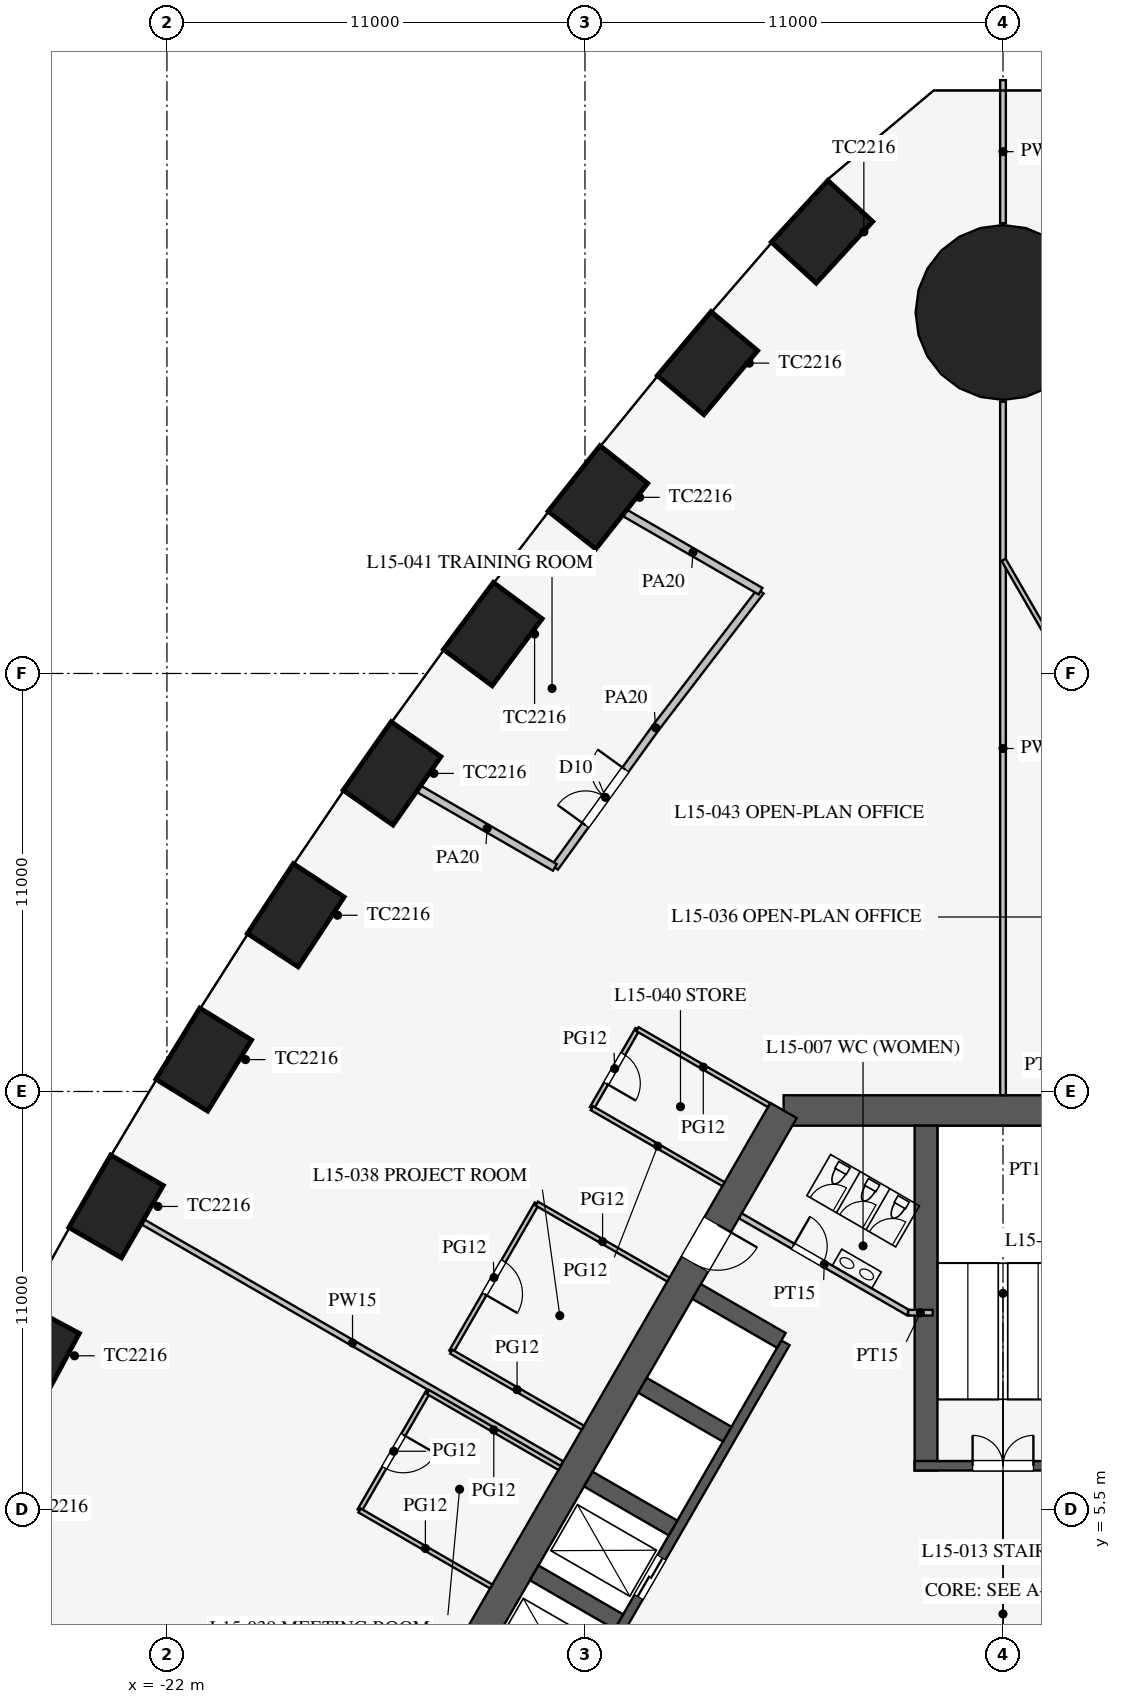
"""IFC4 building model, lengths in metres.
Left out: names, types, materials, properties, quantities, classifications, styles, units other than length and angle.
Written with IfcOpenShell. Run it as: python <this file> out.ifc"""

import sys

from ifc_helpers import new_model, si_unit, direction, frame, frame_2d, origin, origin_2d, place, context, subcontext, project, spatial, rectangle, circle, extrude, element, fill, save


model = new_model("IFC4")
c1 = context("Model", 3, precision=1e-05, world=origin(), true_north=direction((0.0, 1.0)))
c2 = subcontext(c1, "Body", "Model", "MODEL_VIEW")
j1 = project(units=[si_unit("LENGTHUNIT", "METRE"), si_unit("PLANEANGLEUNIT", "RADIAN")], contexts=[c1])
p1 = place(None, origin())
s1 = spatial("IfcSite", under=j1, at=p1, CompositionType="ELEMENT")
p2 = place(p1, origin())
s2 = spatial("IfcBuilding", under=s1, at=p2, CompositionType="ELEMENT")
p3 = place(p2, frame((0.0, 0.0, 66.9)))
s3 = spatial("IfcBuildingStorey", under=s2, at=p3, CompositionType="ELEMENT", Elevation=66.9)
for number, where, z_axis, x_axis in (
    (1, (-4.762, 39.122, 0.0), (0.0, 0.0, 1.0), (-0.676, -0.737, 0.0)),
    (2, (-7.776, 35.667, 0.0), (0.0, 0.0, 1.0), (-0.643, -0.766, 0.0)),
    (3, (-10.66, 32.135, 0.0), (0.0, 0.0, 1.0), (-0.62, -0.784, 0.0)),
    (4, (-13.426, 28.536, 0.0), (0.0, 0.0, 1.0), (-0.597, -0.802, 0.0)),
    (5, (-16.076, 24.87, 0.0), (0.0, 0.0, 1.0), (-0.574, -0.819, 0.0)),
    (6, (-18.611, 21.137, 0.0), (0.0, 0.0, 1.0), (-0.549, -0.836, 0.0)),
    (7, (-21.031, 17.339, 0.0), (0.0, 0.0, 1.0), (-0.525, -0.851, 0.0)),
    (8, (-23.338, 13.474, 0.0), (0.0, 0.0, 1.0), (-0.5, -0.866, 0.0)),
    (9, (-25.531, 9.544, 0.0), (0.0, 0.0, 1.0), (-0.475, -0.88, 0.0)),
):
    element("IfcColumn", number, at=place(p3, frame(where, z_axis=z_axis, x_axis=x_axis)), inside=s3, PredefinedType="COLUMN", context=c2, shape_type="SweptSolid", body=[
        extrude(rectangle(XDim=2.2, YDim=1.6, at=origin_2d()), origin(), (0.0, 0.0, 1.0), 4.2),
    ])
p4 = place(p3, frame((0.0, 37.0, 0.0), z_axis=(0.0, 0.0, 1.0), x_axis=(1.0, 0.0, 0.0)))
e10 = element("IfcColumn", 10, at=p4, inside=s3, PredefinedType="COLUMN", context=c2, shape_type="SweptSolid", body=[
    extrude(circle(Radius=2.3, at=origin_2d()), origin(), (0.0, 0.0, 1.0), 4.2),
])
p5 = place(p3, frame((5.773, 16.0, 0.0), z_axis=(0.0, 0.0, 1.0), x_axis=(-1.0, 0.0, 0.0)))
e11 = element("IfcWall", 11, at=p5, inside=s3, PredefinedType="SHEAR", context=c2, shape_type="SweptSolid", body=[
    extrude(rectangle(XDim=11.547, YDim=0.8, at=frame_2d((5.773, 0.0))), origin(), (0.0, 0.0, 1.0), 4.2),
])
p6 = place(p3, frame((-5.773, 16.0, 0.0), z_axis=(0.0, 0.0, 1.0), x_axis=(-0.500002442456, -0.866023993627, 0.0)))
e12 = element("IfcWall", 12, at=p6, inside=s3, PredefinedType="SHEAR", context=c2, shape_type="SweptSolid", body=[
    extrude(rectangle(XDim=21.939, YDim=0.8, at=frame_2d((10.97, 0.0))), origin(), (0.0, 0.0, 1.0), 4.2),
])
p7 = place(p6, frame((17.27, 0.0, 0.0)))
e13 = element("IfcOpeningElement", 13, at=p7, cuts=e12, PredefinedType="OPENING", context=c2, shape_type="SweptSolid", body=[
    extrude(rectangle(XDim=1.2, YDim=2.1, at=frame_2d((0.6, 1.05))), frame((0.0, 0.41, 0.0), z_axis=(0.0, -1.0, 0.0), x_axis=(1.0, 0.0, 0.0)), (0.0, 0.0, 1.0), 0.82),
])
p8 = place(p6, frame((3.47, 0.0, 0.0)))
e14 = element("IfcOpeningElement", 14, at=p8, cuts=e12, PredefinedType="OPENING", context=c2, shape_type="SweptSolid", body=[
    extrude(rectangle(XDim=1.2, YDim=2.1, at=frame_2d((0.6, 1.05))), frame((0.0, 0.41, 0.0), z_axis=(0.0, -1.0, 0.0), x_axis=(1.0, 0.0, 0.0)), (0.0, 0.0, 1.0), 0.82),
])
p9 = place(p3, frame((-5.724, 9.886, 0.0), z_axis=(0.0, 0.0, 1.0), x_axis=(-0.500001763848, -0.866024385424, 0.0)))
e15 = element("IfcWall", 15, at=p9, inside=s3, PredefinedType="SHEAR", context=c2, shape_type="SweptSolid", body=[
    extrude(rectangle(XDim=11.4, YDim=0.25, at=frame_2d((5.7, 0.0))), origin(), (0.0, 0.0, 1.0), 4.2),
])
p10 = place(p9, frame((6.525, 0.0, 0.0)))
e16 = element("IfcOpeningElement", 16, at=p10, cuts=e15, PredefinedType="OPENING", context=c2, shape_type="SweptSolid", body=[
    extrude(rectangle(XDim=1.2, YDim=2.2, at=frame_2d((0.6, 1.1))), frame((0.0, 0.135, 0.0), z_axis=(0.0, -1.0, 0.0), x_axis=(1.0, 0.0, 0.0)), (0.0, 0.0, 1.0), 0.27),
])
p11 = place(p9, frame((9.375, 0.0, 0.0)))
e17 = element("IfcOpeningElement", 17, at=p11, cuts=e15, PredefinedType="OPENING", context=c2, shape_type="SweptSolid", body=[
    extrude(rectangle(XDim=1.2, YDim=2.2, at=frame_2d((0.6, 1.1))), frame((0.0, 0.135, 0.0), z_axis=(0.0, -1.0, 0.0), x_axis=(1.0, 0.0, 0.0)), (0.0, 0.0, 1.0), 0.27),
])
p12 = place(p3, frame((-5.832, 9.949, 0.0), z_axis=(0.0, 0.0, 1.0), x_axis=(-0.866029291668, 0.499993265928, 0.0)))
e18 = element("IfcWall", 18, at=p12, inside=s3, PredefinedType="SHEAR", context=c2, shape_type="SweptSolid", body=[
    extrude(rectangle(XDim=2.575, YDim=0.45, at=frame_2d((1.288, 0.0))), origin(), (0.0, 0.0, 1.0), 4.2),
])
for number, where, z_axis, x_axis in (
    (19, (-7.257, 7.481, 0.0), (0.0, 0.0, 1.0), (-0.866, 0.5, 0.0)),
    (20, (-8.682, 5.012, 0.0), (0.0, 0.0, 1.0), (-0.866, 0.5, 0.0)),
    (21, (-10.107, 2.544, 0.0), (0.0, 0.0, 1.0), (-0.866, 0.5, 0.0)),
):
    element("IfcWall", number, at=place(p3, frame(where, z_axis=z_axis, x_axis=x_axis)), inside=s3, PredefinedType="SHEAR", context=c2, shape_type="SweptSolid", body=[
        extrude(rectangle(XDim=2.575, YDim=0.45, at=frame_2d((1.288, 0.0))), origin(), (0.0, 0.0, 1.0), 4.2),
    ])
p13 = place(p3, frame((-2.025, 6.525, 0.0), z_axis=(0.0, 0.0, 1.0), x_axis=(0.0, 1.0, 0.0)))
e22 = element("IfcWall", 22, at=p13, inside=s3, PredefinedType="SHEAR", context=c2, shape_type="SweptSolid", body=[
    extrude(rectangle(XDim=9.075, YDim=0.6, at=frame_2d((4.538, 0.0))), origin(), (0.0, 0.0, 1.0), 4.2),
])
p14 = place(p3, frame((2.325, 6.65, 0.0), z_axis=(0.0, 0.0, 1.0), x_axis=(-1.0, 0.0, 0.0)))
e23 = element("IfcWall", 23, at=p14, inside=s3, PredefinedType="SHEAR", context=c2, shape_type="SweptSolid", body=[
    extrude(rectangle(XDim=4.65, YDim=0.25, at=frame_2d((2.325, 0.0))), origin(), (0.0, 0.0, 1.0), 4.2),
])
p15 = place(p14, frame((1.525, 0.0, 0.0)))
e24 = element("IfcOpeningElement", 24, at=p15, cuts=e23, PredefinedType="OPENING", context=c2, shape_type="SweptSolid", body=[
    extrude(rectangle(XDim=1.6, YDim=2.1, at=frame_2d((0.8, 1.05))), frame((0.0, 0.135, 0.0), z_axis=(0.0, -1.0, 0.0), x_axis=(1.0, 0.0, 0.0)), (0.0, 0.0, 1.0), 0.27),
])
p16 = place(p3, frame((-2.495, 10.678, 0.0), z_axis=(0.0, 0.0, 1.0), x_axis=(-0.86602216432, 0.500005610874, 0.0)))
e25 = element("IfcWall", 25, at=p16, inside=s3, PredefinedType="PARTITIONING", context=c2, shape_type="SweptSolid", body=[
    extrude(rectangle(XDim=5.1, YDim=0.15, at=frame_2d((2.55, 0.0))), origin(), (0.0, 0.0, 1.0), 4.0),
])
p17 = place(p16, frame((2.6, 0.0, 0.0)))
e26 = element("IfcOpeningElement", 26, at=p17, cuts=e25, PredefinedType="OPENING", context=c2, shape_type="SweptSolid", body=[
    extrude(rectangle(XDim=0.9, YDim=2.1, at=frame_2d((0.45, 1.05))), frame((0.0, 0.085, 0.0), z_axis=(0.0, -1.0, 0.0), x_axis=(1.0, 0.0, 0.0)), (0.0, 0.0, 1.0), 0.17),
])
p18 = place(p3, frame((-2.495, 10.678, 0.0), z_axis=(0.0, 0.0, 1.0), x_axis=(1.0, 0.0, 0.0)))
e27 = element("IfcWall", 27, at=p18, inside=s3, PredefinedType="PARTITIONING", context=c2, shape_type="SweptSolid", body=[
    extrude(rectangle(XDim=0.645, YDim=0.15, at=frame_2d((0.323, 0.0))), origin(), (0.0, 0.0, 1.0), 4.0),
])
p19 = place(p3, frame((0.0, 16.4, 0.0), z_axis=(0.0, 0.0, 1.0), x_axis=(0.0, 1.0, 0.0)))
e28 = element("IfcWall", 28, at=p19, inside=s3, PredefinedType="PARTITIONING", context=c2, shape_type="SweptSolid", body=[
    extrude(rectangle(XDim=18.25, YDim=0.15, at=frame_2d((9.125, 0.0))), origin(), (0.0, 0.0, 1.0), 2.3),
])
p20 = place(p3, frame((0.0, 39.35, 0.0), z_axis=(0.0, 0.0, 1.0), x_axis=(0.0, 1.0, 0.0)))
e29 = element("IfcWall", 29, at=p20, inside=s3, PredefinedType="PARTITIONING", context=c2, shape_type="SweptSolid", body=[
    extrude(rectangle(XDim=3.764, YDim=0.15, at=frame_2d((1.882, 0.0))), origin(), (0.0, 0.0, 1.0), 2.3),
])
p21 = place(p3, frame((26.415, -15.231, 0.0), z_axis=(0.0, 0.0, 1.0), x_axis=(-0.50000091641, 0.866024874695, 0.0)))
e30 = element("IfcWall", 30, at=p21, inside=s3, PredefinedType="PARTITIONING", context=c2, shape_type="SweptSolid", body=[
    extrude(rectangle(XDim=52.796, YDim=0.12, at=frame_2d((26.398, 0.0))), origin(), (0.0, 0.0, 1.0), 2.9),
])
p22 = place(p21, frame((10.2, 0.0, 0.15)))
e31 = element("IfcOpeningElement", 31, at=p22, cuts=e30, PredefinedType="OPENING", context=c2, shape_type="SweptSolid", body=[
    extrude(rectangle(XDim=1.8, YDim=2.1, at=frame_2d((0.9, 1.05))), frame((0.0, 0.07, 0.0), z_axis=(0.0, -1.0, 0.0), x_axis=(1.0, 0.0, 0.0)), (0.0, 0.0, 1.0), 0.14),
])
p23 = place(p21, frame((40.8, 0.0, 0.15)))
e32 = element("IfcOpeningElement", 32, at=p23, cuts=e30, PredefinedType="OPENING", context=c2, shape_type="SweptSolid", body=[
    extrude(rectangle(XDim=1.8, YDim=2.1, at=frame_2d((0.9, 1.05))), frame((0.0, 0.07, 0.0), z_axis=(0.0, -1.0, 0.0), x_axis=(1.0, 0.0, 0.0)), (0.0, 0.0, 1.0), 0.14),
])
p24 = place(p3, frame((-11.613, 6.705, 0.0), z_axis=(0.0, 0.0, 1.0), x_axis=(-0.866029791586, 0.499992400027, 0.0)))
e33 = element("IfcWall", 33, at=p24, inside=s3, PredefinedType="PARTITIONING", context=c2, shape_type="SweptSolid", body=[
    extrude(rectangle(XDim=12.709, YDim=0.15, at=frame_2d((6.354, 0.0))), origin(), (0.0, 0.0, 1.0), 2.8),
])
p25 = place(p3, frame((-15.131, 8.592, 0.0), z_axis=(0.0, 0.0, 1.0), x_axis=(-0.500012057535, -0.866018442252, 0.0)))
e34 = element("IfcWall", 34, at=p25, inside=s3, PredefinedType="PARTITIONING", context=c2, shape_type="SweptSolid", body=[
    extrude(rectangle(XDim=3.6, YDim=0.12, at=frame_2d((1.8, 0.0))), origin(), (0.0, 0.0, 1.0), 2.9),
])
p26 = place(p25, frame((1.3, 0.0, 0.15)))
e35 = element("IfcOpeningElement", 35, at=p26, cuts=e34, PredefinedType="OPENING", context=c2, shape_type="SweptSolid", body=[
    extrude(rectangle(XDim=1.0, YDim=2.1, at=frame_2d((0.5, 1.05))), frame((0.0, 0.07, 0.0), z_axis=(0.0, -1.0, 0.0), x_axis=(1.0, 0.0, 0.0)), (0.0, 0.0, 1.0), 0.14),
])
p27 = place(p3, frame((-9.619, 18.14, 0.0), z_axis=(0.0, 0.0, 1.0), x_axis=(-0.500001309137, -0.866024647952, 0.0)))
e36 = element("IfcWall", 36, at=p27, inside=s3, PredefinedType="PARTITIONING", context=c2, shape_type="SweptSolid", body=[
    extrude(rectangle(XDim=2.4, YDim=0.12, at=frame_2d((1.2, 0.0))), origin(), (0.0, 0.0, 1.0), 2.9),
])
p28 = place(p27, frame((0.75, 0.0, 0.15)))
e37 = element("IfcOpeningElement", 37, at=p28, cuts=e36, PredefinedType="OPENING", context=c2, shape_type="SweptSolid", body=[
    extrude(rectangle(XDim=0.9, YDim=2.1, at=frame_2d((0.45, 1.05))), frame((0.0, 0.07, 0.0), z_axis=(0.0, -1.0, 0.0), x_axis=(1.0, 0.0, 0.0)), (0.0, 0.0, 1.0), 0.14),
])
p29 = place(p3, frame((-12.269, 13.55, 0.0), z_axis=(0.0, 0.0, 1.0), x_axis=(-0.499990139034, -0.866031096941, 0.0)))
e38 = element("IfcWall", 38, at=p29, inside=s3, PredefinedType="PARTITIONING", context=c2, shape_type="SweptSolid", body=[
    extrude(rectangle(XDim=4.5, YDim=0.12, at=frame_2d((2.25, 0.0))), origin(), (0.0, 0.0, 1.0), 2.9),
])
p30 = place(p29, frame((1.75, 0.0, 0.15)))
e39 = element("IfcOpeningElement", 39, at=p30, cuts=e38, PredefinedType="OPENING", context=c2, shape_type="SweptSolid", body=[
    extrude(rectangle(XDim=1.0, YDim=2.1, at=frame_2d((0.5, 1.05))), frame((0.0, 0.07, 0.0), z_axis=(0.0, -1.0, 0.0), x_axis=(1.0, 0.0, 0.0)), (0.0, 0.0, 1.0), 0.14),
])
p31 = place(p3, frame((-11.667, 6.592, 0.0), z_axis=(0.0, 0.0, 1.0), x_axis=(-0.866026010844, 0.49999894854, 0.0)))
e40 = element("IfcWall", 40, at=p31, inside=s3, PredefinedType="PARTITIONING", context=c2, shape_type="SweptSolid", body=[
    extrude(rectangle(XDim=4.0, YDim=0.12, at=frame_2d((2.0, 0.0))), origin(), (0.0, 0.0, 1.0), 2.8),
])
for number, where, z_axis, x_axis in (
    (41, (-13.467, 3.474, 0.0), (0.0, 0.0, 1.0), (-0.866, 0.5, 0.0)),
    (42, (-11.055, 7.653, 0.0), (0.0, 0.0, 1.0), (-0.866, 0.5, 0.0)),
    (43, (-6.155, 16.14, 0.0), (0.0, 0.0, 1.0), (-0.866, 0.5, 0.0)),
    (44, (-8.805, 11.55, 0.0), (0.0, 0.0, 1.0), (-0.866, 0.5, 0.0)),
    (45, (-7.355, 14.061, 0.0), (0.0, 0.0, 1.0), (-0.866, 0.5, 0.0)),
):
    element("IfcWall", number, at=place(p3, frame(where, z_axis=z_axis, x_axis=x_axis)), inside=s3, PredefinedType="PARTITIONING", context=c2, shape_type="SweptSolid", body=[
        extrude(rectangle(XDim=4.0, YDim=0.12, at=frame_2d((2.0, 0.0))), origin(), (0.0, 0.0, 1.0), 2.9),
    ])
p32 = place(p3, frame((-9.144, 26.064, 0.0), z_axis=(0.0, 0.0, 1.0), x_axis=(-0.585376255171, -0.810761765183, 0.0)))
e46 = element("IfcWall", 46, at=p32, inside=s3, PredefinedType="PARTITIONING", context=c2, shape_type="SweptSolid", body=[
    extrude(rectangle(XDim=4.523, YDim=0.2, at=frame_2d((2.262, 0.0))), origin(), (0.0, 0.0, 1.0), 2.9),
])
p33 = place(p32, frame((1.35, 0.0, 0.15)))
e47 = element("IfcOpeningElement", 47, at=p33, cuts=e46, PredefinedType="OPENING", context=c2, shape_type="SweptSolid", body=[
    extrude(rectangle(XDim=1.8, YDim=2.1, at=frame_2d((0.9, 1.05))), frame((0.0, 0.11, 0.0), z_axis=(0.0, -1.0, 0.0), x_axis=(1.0, 0.0, 0.0)), (0.0, 0.0, 1.0), 0.22),
])
p34 = place(p3, frame((-6.38, 29.665, 0.0), z_axis=(0.0, 0.0, 1.0), x_axis=(-0.608818785139, -0.79330932609, 0.0)))
e48 = element("IfcWall", 48, at=p34, inside=s3, PredefinedType="PARTITIONING", context=c2, shape_type="SweptSolid", body=[
    extrude(rectangle(XDim=4.539, YDim=0.2, at=frame_2d((2.27, 0.0))), origin(), (0.0, 0.0, 1.0), 2.9),
])
p35 = place(p3, frame((-11.792, 22.396, 0.0), z_axis=(0.0, 0.0, 1.0), x_axis=(-0.865991869213, 0.500058079084, 0.0)))
e49 = element("IfcWall", 49, at=p35, inside=s3, PredefinedType="PARTITIONING", context=c2, shape_type="SweptSolid", body=[
    extrude(rectangle(XDim=4.114, YDim=0.2, at=frame_2d((2.057, 0.0))), origin(), (0.0, 0.0, 1.0), 2.6),
])
p36 = place(p3, frame((-6.38, 29.665, 0.0), z_axis=(0.0, 0.0, 1.0), x_axis=(-0.866044878051, 0.499966268063, 0.0)))
e50 = element("IfcWall", 50, at=p36, inside=s3, PredefinedType="PARTITIONING", context=c2, shape_type="SweptSolid", body=[
    extrude(rectangle(XDim=4.103, YDim=0.2, at=frame_2d((2.051, 0.0))), origin(), (0.0, 0.0, 1.0), 2.8),
])
p37 = place(p17, frame((0.9, 0.0, 0.0), z_axis=(0.0, 0.0, 1.0), x_axis=(-1.0, 0.0, 0.0)))
e51 = element("IfcDoor", 51, at=p37, inside=s3, OperationType="SINGLE_SWING_LEFT", PredefinedType="DOOR", context=c2, shape_type="SweptSolid", body=[
    extrude(rectangle(XDim=0.9, YDim=2.1, at=frame_2d((0.45, 1.05))), frame((0.0, 0.025, 0.0), z_axis=(0.0, -1.0, 0.0), x_axis=(1.0, 0.0, 0.0)), (0.0, 0.0, 1.0), 0.05),
])
fill(e26, e51)
p38 = place(p15, frame((1.6, 0.0, 0.0), z_axis=(0.0, 0.0, 1.0), x_axis=(-1.0, 0.0, 0.0)))
e52 = element("IfcDoor", 52, at=p38, inside=s3, OperationType="DOUBLE_DOOR_SINGLE_SWING", PredefinedType="DOOR", context=c2, shape_type="SweptSolid", body=[
    extrude(rectangle(XDim=1.6, YDim=2.1, at=frame_2d((0.8, 1.05))), frame((0.0, 0.025, 0.0), z_axis=(0.0, -1.0, 0.0), x_axis=(1.0, 0.0, 0.0)), (0.0, 0.0, 1.0), 0.05),
])
fill(e24, e52)
p39 = place(p8, origin())
e53 = element("IfcDoor", 53, at=p39, inside=s3, OperationType="SINGLE_SWING_LEFT", PredefinedType="DOOR", context=c2, shape_type="SweptSolid", body=[
    extrude(rectangle(XDim=1.2, YDim=2.1, at=frame_2d((0.6, 1.05))), frame((0.0, 0.025, 0.0), z_axis=(0.0, -1.0, 0.0), x_axis=(1.0, 0.0, 0.0)), (0.0, 0.0, 1.0), 0.05),
])
fill(e14, e53)
p40 = place(p30, origin())
e54 = element("IfcDoor", 54, at=p40, inside=s3, OperationType="SINGLE_SWING_RIGHT", PredefinedType="DOOR", context=c2, shape_type="SweptSolid", body=[
    extrude(rectangle(XDim=1.0, YDim=2.1, at=frame_2d((0.5, 1.05))), frame((0.0, 0.025, 0.0), z_axis=(0.0, -1.0, 0.0), x_axis=(1.0, 0.0, 0.0)), (0.0, 0.0, 1.0), 0.05),
])
fill(e39, e54)
p41 = place(p26, origin())
e55 = element("IfcDoor", 55, at=p41, inside=s3, OperationType="SINGLE_SWING_LEFT", PredefinedType="DOOR", context=c2, shape_type="SweptSolid", body=[
    extrude(rectangle(XDim=1.0, YDim=2.1, at=frame_2d((0.5, 1.05))), frame((0.0, 0.025, 0.0), z_axis=(0.0, -1.0, 0.0), x_axis=(1.0, 0.0, 0.0)), (0.0, 0.0, 1.0), 0.05),
])
fill(e35, e55)
p42 = place(p28, origin())
e56 = element("IfcDoor", 56, at=p42, inside=s3, OperationType="SINGLE_SWING_RIGHT", PredefinedType="DOOR", context=c2, shape_type="SweptSolid", body=[
    extrude(rectangle(XDim=0.9, YDim=2.1, at=frame_2d((0.45, 1.05))), frame((0.0, 0.025, 0.0), z_axis=(0.0, -1.0, 0.0), x_axis=(1.0, 0.0, 0.0)), (0.0, 0.0, 1.0), 0.05),
])
fill(e37, e56)
p43 = place(p33, frame((1.8, 0.0, 0.0), z_axis=(0.0, 0.0, 1.0), x_axis=(-1.0, 0.0, 0.0)))
e57 = element("IfcDoor", 57, at=p43, inside=s3, OperationType="DOUBLE_DOOR_SINGLE_SWING", PredefinedType="DOOR", context=c2, shape_type="SweptSolid", body=[
    extrude(rectangle(XDim=1.8, YDim=2.1, at=frame_2d((0.9, 1.05))), frame((0.0, 0.025, 0.0), z_axis=(0.0, -1.0, 0.0), x_axis=(1.0, 0.0, 0.0)), (0.0, 0.0, 1.0), 0.05),
])
fill(e47, e57)
p44 = place(p10, origin())
e58 = element("IfcDoor", 58, at=p44, inside=s3, OperationType="DOUBLE_DOOR_SLIDING", PredefinedType="DOOR", context=c2, shape_type="SweptSolid", body=[
    extrude(rectangle(XDim=1.2, YDim=2.2, at=frame_2d((0.6, 1.1))), frame((0.0, 0.025, 0.0), z_axis=(0.0, -1.0, 0.0), x_axis=(1.0, 0.0, 0.0)), (0.0, 0.0, 1.0), 0.05),
])
fill(e16, e58)
save(model, sys.argv[1])
